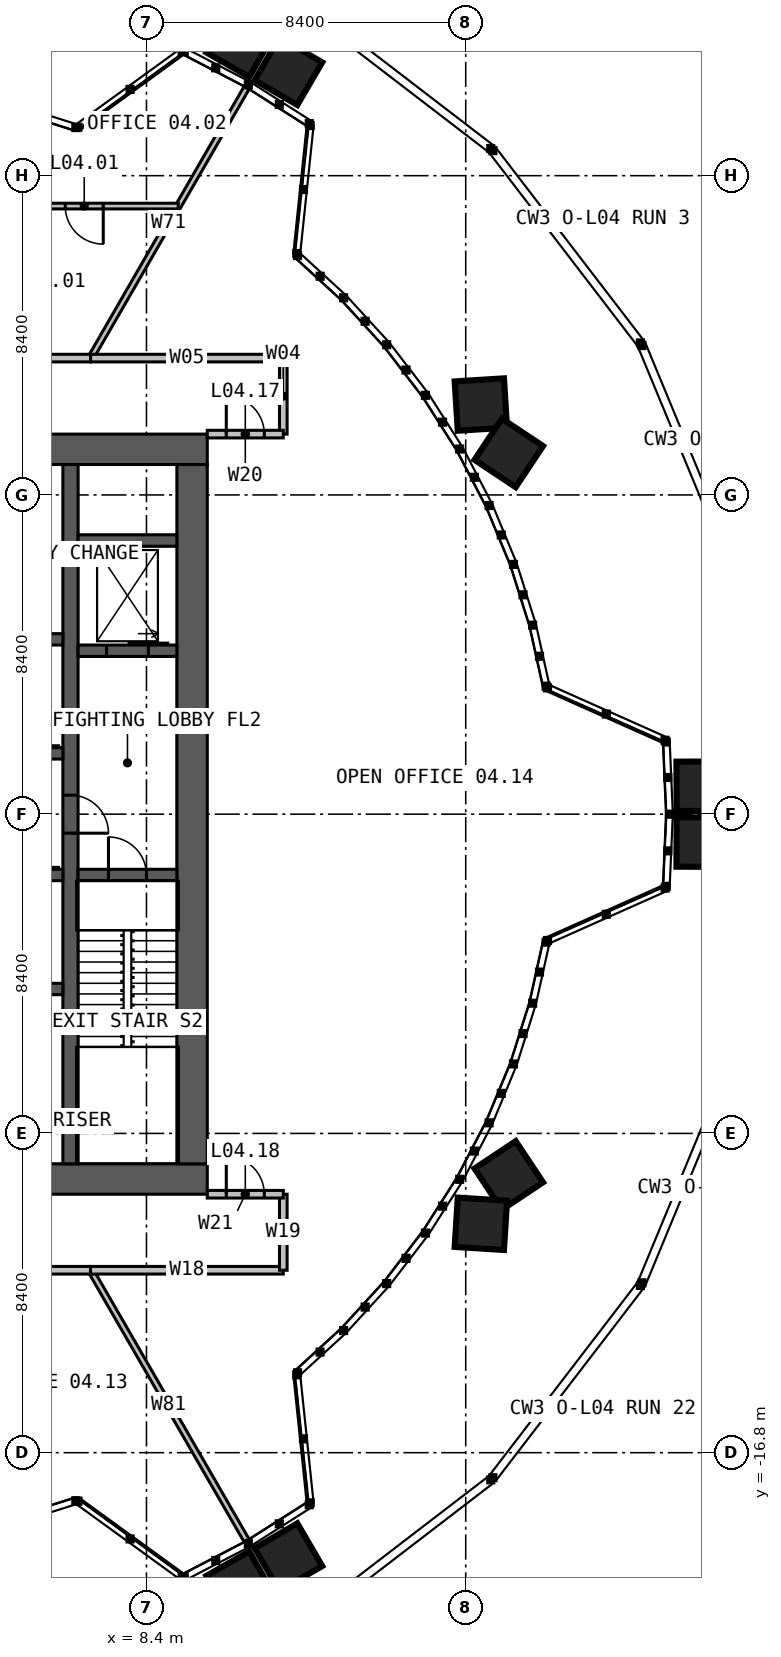
"""IFC4 building model, lengths in metres.
Left out: names, types, materials, properties, quantities, classifications, styles, units other than length and angle.
Written with IfcOpenShell. Run it as: python <this file> out.ifc"""

import sys

from ifc_helpers import new_model, si_unit, direction, frame, frame_2d, origin, place, context, subcontext, project, spatial, rectangle, extrude, element, fill, save


model = new_model("IFC4")
c1 = context("Model", 3, precision=1e-05, world=origin(), true_north=direction((0.0, 1.0)))
c2 = subcontext(c1, "Body", "Model", "MODEL_VIEW")
j1 = project(units=[si_unit("LENGTHUNIT", "METRE"), si_unit("PLANEANGLEUNIT", "RADIAN")], contexts=[c1])
p1 = place(None, origin())
s1 = spatial("IfcSite", under=j1, at=p1, CompositionType="ELEMENT")
p2 = place(p1, origin())
s2 = spatial("IfcBuilding", under=s1, at=p2, CompositionType="ELEMENT")
p3 = place(p2, frame((0.0, 0.0, 21.0)))
s3 = spatial("IfcBuildingStorey", under=s2, at=p3, CompositionType="ELEMENT", Elevation=21.0)
p4 = place(p3, frame((-10.0, 9.6, 0.0), z_axis=(0.0, 0.0, 1.0), x_axis=(1.0, 0.0, 0.0)))
e1 = element("IfcWall", 1, at=p4, inside=s3, PredefinedType="SOLIDWALL", context=c2, shape_type="SweptSolid", body=[
    extrude(rectangle(XDim=20.0, YDim=0.8, at=frame_2d((10.0, 0.0))), origin(), (0.0, 0.0, 1.0), 4.0),
])
p5 = place(p4, frame((9.4, 0.0, 0.0)))
e2 = element("IfcOpeningElement", 2, at=p5, cuts=e1, PredefinedType="OPENING", context=c2, shape_type="SweptSolid", body=[
    extrude(rectangle(XDim=1.2, YDim=2.2, at=frame_2d((0.6, 1.1))), frame((0.0, 0.41, 0.0), z_axis=(0.0, -1.0, 0.0), x_axis=(1.0, 0.0, 0.0)), (0.0, 0.0, 1.0), 0.82),
])
p6 = place(p3, frame((10.0, -9.6, 0.0), z_axis=(0.0, 0.0, 1.0), x_axis=(-1.0, 0.0, 0.0)))
e3 = element("IfcWall", 3, at=p6, inside=s3, PredefinedType="SOLIDWALL", context=c2, shape_type="SweptSolid", body=[
    extrude(rectangle(XDim=20.0, YDim=0.8, at=frame_2d((10.0, 0.0))), origin(), (0.0, 0.0, 1.0), 4.0),
])
p7 = place(p6, frame((6.875, 0.0, 0.0)))
e4 = element("IfcOpeningElement", 4, at=p7, cuts=e3, PredefinedType="OPENING", context=c2, shape_type="SweptSolid", body=[
    extrude(rectangle(XDim=1.2, YDim=2.2, at=frame_2d((0.6, 1.1))), frame((0.0, 0.41, 0.0), z_axis=(0.0, -1.0, 0.0), x_axis=(1.0, 0.0, 0.0)), (0.0, 0.0, 1.0), 0.82),
])
p8 = place(p3, frame((9.6, -9.2, 0.0), z_axis=(0.0, 0.0, 1.0), x_axis=(0.0, 1.0, 0.0)))
e5 = element("IfcWall", 5, at=p8, inside=s3, PredefinedType="SOLIDWALL", context=c2, shape_type="SweptSolid", body=[
    extrude(rectangle(XDim=18.4, YDim=0.8, at=frame_2d((9.2, 0.0))), origin(), (0.0, 0.0, 1.0), 4.0),
])
p9 = place(p3, frame((6.4, 9.2, 0.0), z_axis=(0.0, 0.0, 1.0), x_axis=(0.0, -1.0, 0.0)))
e6 = element("IfcWall", 6, at=p9, inside=s3, PredefinedType="SOLIDWALL", context=c2, shape_type="SweptSolid", body=[
    extrude(rectangle(XDim=18.4, YDim=0.4, at=frame_2d((9.2, 0.0))), origin(), (0.0, 0.0, 1.0), 4.0),
])
p10 = place(p9, frame((8.7, 0.0, 0.0)))
e7 = element("IfcOpeningElement", 7, at=p10, cuts=e6, PredefinedType="OPENING", context=c2, shape_type="SweptSolid", body=[
    extrude(rectangle(XDim=1.0, YDim=2.2, at=frame_2d((0.5, 1.1))), frame((0.0, 0.21, 0.0), z_axis=(0.0, -1.0, 0.0), x_axis=(1.0, 0.0, 0.0)), (0.0, 0.0, 1.0), 0.42),
])
p11 = place(p3, frame((1.35, 1.6, 0.0), z_axis=(0.0, 0.0, 1.0), x_axis=(1.0, 0.0, 0.0)))
e8 = element("IfcWall", 8, at=p11, inside=s3, PredefinedType="SOLIDWALL", context=c2, shape_type="SweptSolid", body=[
    extrude(rectangle(XDim=4.85, YDim=0.3, at=frame_2d((2.425, 0.0))), origin(), (0.0, 0.0, 1.0), 4.0),
])
p12 = place(p11, frame((0.6, 0.0, 0.0)))
e9 = element("IfcOpeningElement", 9, at=p12, cuts=e8, PredefinedType="OPENING", context=c2, shape_type="SweptSolid", body=[
    extrude(rectangle(XDim=1.1, YDim=2.2, at=frame_2d((0.55, 1.1))), frame((0.0, 0.16, 0.0), z_axis=(0.0, -1.0, 0.0), x_axis=(1.0, 0.0, 0.0)), (0.0, 0.0, 1.0), 0.32),
])
p13 = place(p11, frame((3.125, 0.0, 0.0)))
e10 = element("IfcOpeningElement", 10, at=p13, cuts=e8, PredefinedType="OPENING", context=c2, shape_type="SweptSolid", body=[
    extrude(rectangle(XDim=1.1, YDim=2.2, at=frame_2d((0.55, 1.1))), frame((0.0, 0.16, 0.0), z_axis=(0.0, -1.0, 0.0), x_axis=(1.0, 0.0, 0.0)), (0.0, 0.0, 1.0), 0.32),
])
p14 = place(p3, frame((1.35, 4.6, 0.0), z_axis=(0.0, 0.0, 1.0), x_axis=(1.0, 0.0, 0.0)))
e11 = element("IfcWall", 11, at=p14, inside=s3, PredefinedType="SOLIDWALL", context=c2, shape_type="SweptSolid", body=[
    extrude(rectangle(XDim=4.85, YDim=0.3, at=frame_2d((2.425, 0.0))), origin(), (0.0, 0.0, 1.0), 4.0),
])
p15 = place(p3, frame((3.85, -1.6, 0.0), z_axis=(0.0, 0.0, 1.0), x_axis=(1.0, 0.0, 0.0)))
e12 = element("IfcWall", 12, at=p15, inside=s3, PredefinedType="SOLIDWALL", context=c2, shape_type="SweptSolid", body=[
    extrude(rectangle(XDim=2.35, YDim=0.3, at=frame_2d((1.175, 0.0))), origin(), (0.0, 0.0, 1.0), 4.0),
])
p16 = place(p15, frame((0.625, 0.0, 0.0)))
e13 = element("IfcOpeningElement", 13, at=p16, cuts=e12, PredefinedType="OPENING", context=c2, shape_type="SweptSolid", body=[
    extrude(rectangle(XDim=1.1, YDim=2.2, at=frame_2d((0.55, 1.1))), frame((0.0, 0.16, 0.0), z_axis=(0.0, -1.0, 0.0), x_axis=(1.0, 0.0, 0.0)), (0.0, 0.0, 1.0), 0.32),
])
p17 = place(p3, frame((3.85, -4.6, 0.0), z_axis=(0.0, 0.0, 1.0), x_axis=(1.0, 0.0, 0.0)))
e14 = element("IfcWall", 14, at=p17, inside=s3, PredefinedType="SOLIDWALL", context=c2, shape_type="SweptSolid", body=[
    extrude(rectangle(XDim=2.35, YDim=0.3, at=frame_2d((1.175, 0.0))), origin(), (0.0, 0.0, 1.0), 4.0),
])
p18 = place(p3, frame((6.6, -1.6, 0.0), z_axis=(0.0, 0.0, 1.0), x_axis=(1.0, 0.0, 0.0)))
e15 = element("IfcWall", 15, at=p18, inside=s3, PredefinedType="SOLIDWALL", context=c2, shape_type="SweptSolid", body=[
    extrude(rectangle(XDim=2.6, YDim=0.3, at=frame_2d((1.3, 0.0))), origin(), (0.0, 0.0, 1.0), 4.0),
])
p19 = place(p18, frame((0.8, 0.0, 0.0)))
e16 = element("IfcOpeningElement", 16, at=p19, cuts=e15, PredefinedType="OPENING", context=c2, shape_type="SweptSolid", body=[
    extrude(rectangle(XDim=1.0, YDim=2.2, at=frame_2d((0.5, 1.1))), frame((0.0, 0.16, 0.0), z_axis=(0.0, -1.0, 0.0), x_axis=(1.0, 0.0, 0.0)), (0.0, 0.0, 1.0), 0.32),
])
p20 = place(p3, frame((6.6, 4.3, 0.0), z_axis=(0.0, 0.0, 1.0), x_axis=(1.0, 0.0, 0.0)))
e17 = element("IfcWall", 17, at=p20, inside=s3, PredefinedType="SOLIDWALL", context=c2, shape_type="SweptSolid", body=[
    extrude(rectangle(XDim=2.6, YDim=0.3, at=frame_2d((1.3, 0.0))), origin(), (0.0, 0.0, 1.0), 4.0),
])
p21 = place(p20, frame((0.75, 0.0, 0.0)))
e18 = element("IfcOpeningElement", 18, at=p21, cuts=e17, PredefinedType="OPENING", context=c2, shape_type="SweptSolid", body=[
    extrude(rectangle(XDim=1.1, YDim=2.2, at=frame_2d((0.55, 1.1))), frame((0.0, 0.16, 0.0), z_axis=(0.0, -1.0, 0.0), x_axis=(1.0, 0.0, 0.0)), (0.0, 0.0, 1.0), 0.32),
])
p22 = place(p3, frame((6.6, 7.2, 0.0), z_axis=(0.0, 0.0, 1.0), x_axis=(1.0, 0.0, 0.0)))
e19 = element("IfcWall", 19, at=p22, inside=s3, PredefinedType="SOLIDWALL", context=c2, shape_type="SweptSolid", body=[
    extrude(rectangle(XDim=2.6, YDim=0.3, at=frame_2d((1.3, 0.0))), origin(), (0.0, 0.0, 1.0), 4.0),
])
p23 = place(p3, frame((1.35, 6.8, 0.0), z_axis=(0.0, 0.0, 1.0), x_axis=(1.0, 0.0, 0.0)))
e20 = element("IfcWall", 20, at=p23, inside=s3, PredefinedType="PARTITIONING", context=c2, shape_type="SweptSolid", body=[
    extrude(rectangle(XDim=4.85, YDim=0.15, at=frame_2d((2.425, 0.0))), origin(), (0.0, 0.0, 1.0), 3.75),
])
for number, where, z_axis, x_axis in (
    (21, (6.928, 12.0, 0.0), (0.0, 0.0, 1.0), (0.5, 0.866, 0.0)),
    (22, (6.928, -12.0, 0.0), (0.0, 0.0, 1.0), (0.5, -0.866, 0.0)),
):
    element("IfcWall", number, at=place(p3, frame(where, z_axis=z_axis, x_axis=x_axis)), inside=s3, PredefinedType="PARTITIONING", context=c2, shape_type="SweptSolid", body=[
        extrude(rectangle(XDim=8.212, YDim=0.15, at=frame_2d((4.106, 0.0))), origin(), (0.0, 0.0, 1.0), 2.79),
    ])
p24 = place(p3, frame((12.0, 10.0, 0.0), z_axis=(0.0, 0.0, 1.0), x_axis=(0.0, 1.0, 0.0)))
e23 = element("IfcWall", 23, at=p24, inside=s3, PredefinedType="PARTITIONING", context=c2, shape_type="SweptSolid", body=[
    extrude(rectangle(XDim=2.0, YDim=0.2, at=frame_2d((1.0, 0.0))), origin(), (0.0, 0.0, 1.0), 3.8),
])
p25 = place(p3, frame((12.0, 12.0, 0.0), z_axis=(0.0, 0.0, 1.0), x_axis=(-1.0, 0.0, 0.0)))
e24 = element("IfcWall", 24, at=p25, inside=s3, PredefinedType="PARTITIONING", context=c2, shape_type="SweptSolid", body=[
    extrude(rectangle(XDim=5.072, YDim=0.2, at=frame_2d((2.536, 0.0))), origin(), (0.0, 0.0, 1.0), 3.8),
])
p26 = place(p3, frame((9.238, 16.0, 0.0), z_axis=(0.0, 0.0, 1.0), x_axis=(-1.0, 0.0, 0.0)))
e25 = element("IfcWall", 25, at=p26, inside=s3, PredefinedType="PARTITIONING", context=c2, shape_type="SweptSolid", body=[
    extrude(rectangle(XDim=9.238, YDim=0.15, at=frame_2d((4.619, 0.0))), origin(), (0.0, 0.0, 1.0), 2.79),
])
p27 = place(p26, frame((1.975, 0.0, 0.0)))
e26 = element("IfcOpeningElement", 26, at=p27, cuts=e25, PredefinedType="OPENING", context=c2, shape_type="SweptSolid", body=[
    extrude(rectangle(XDim=1.0, YDim=2.2, at=frame_2d((0.5, 1.1))), frame((0.0, 0.085, 0.0), z_axis=(0.0, -1.0, 0.0), x_axis=(1.0, 0.0, 0.0)), (0.0, 0.0, 1.0), 0.17),
])
p28 = place(p26, frame((5.541, 0.0, 0.0)))
e27 = element("IfcOpeningElement", 27, at=p28, cuts=e25, PredefinedType="OPENING", context=c2, shape_type="SweptSolid", body=[
    extrude(rectangle(XDim=1.0, YDim=2.2, at=frame_2d((0.5, 1.1))), frame((0.0, 0.085, 0.0), z_axis=(0.0, -1.0, 0.0), x_axis=(1.0, 0.0, 0.0)), (0.0, 0.0, 1.0), 0.17),
])
p29 = place(p26, frame((7.684, 0.0, 0.0)))
e28 = element("IfcOpeningElement", 28, at=p29, cuts=e25, PredefinedType="OPENING", context=c2, shape_type="SweptSolid", body=[
    extrude(rectangle(XDim=1.0, YDim=2.2, at=frame_2d((0.5, 1.1))), frame((0.0, 0.085, 0.0), z_axis=(0.0, -1.0, 0.0), x_axis=(1.0, 0.0, 0.0)), (0.0, 0.0, 1.0), 0.17),
])
p30 = place(p3, frame((6.928, 12.0, 0.0), z_axis=(0.0, 0.0, 1.0), x_axis=(-1.0, 0.0, 0.0)))
e29 = element("IfcWall", 29, at=p30, inside=s3, PredefinedType="PARTITIONING", context=c2, shape_type="SweptSolid", body=[
    extrude(rectangle(XDim=6.928, YDim=0.2, at=frame_2d((3.464, 0.0))), origin(), (0.0, 0.0, 1.0), 3.8),
])
p31 = place(p30, frame((2.964, 0.0, 0.0)))
e30 = element("IfcOpeningElement", 30, at=p31, cuts=e29, PredefinedType="OPENING", context=c2, shape_type="SweptSolid", body=[
    extrude(rectangle(XDim=1.0, YDim=2.2, at=frame_2d((0.5, 1.1))), frame((0.0, 0.11, 0.0), z_axis=(0.0, -1.0, 0.0), x_axis=(1.0, 0.0, 0.0)), (0.0, 0.0, 1.0), 0.22),
])
p32 = place(p3, frame((1.58, -12.0, 0.0), z_axis=(0.0, 0.0, 1.0), x_axis=(1.0, 0.0, 0.0)))
e31 = element("IfcWall", 31, at=p32, inside=s3, PredefinedType="PARTITIONING", context=c2, shape_type="SweptSolid", body=[
    extrude(rectangle(XDim=5.348, YDim=0.2, at=frame_2d((2.674, 0.0))), origin(), (0.0, 0.0, 1.0), 3.8),
])
p33 = place(p32, frame((1.774, 0.0, 0.0)))
e32 = element("IfcOpeningElement", 32, at=p33, cuts=e31, PredefinedType="OPENING", context=c2, shape_type="SweptSolid", body=[
    extrude(rectangle(XDim=1.8, YDim=2.2, at=frame_2d((0.9, 1.1))), frame((0.0, 0.11, 0.0), z_axis=(0.0, -1.0, 0.0), x_axis=(1.0, 0.0, 0.0)), (0.0, 0.0, 1.0), 0.22),
])
p34 = place(p3, frame((6.928, -12.0, 0.0), z_axis=(0.0, 0.0, 1.0), x_axis=(1.0, 0.0, 0.0)))
e33 = element("IfcWall", 33, at=p34, inside=s3, PredefinedType="PARTITIONING", context=c2, shape_type="SweptSolid", body=[
    extrude(rectangle(XDim=5.072, YDim=0.2, at=frame_2d((2.536, 0.0))), origin(), (0.0, 0.0, 1.0), 3.8),
])
p35 = place(p3, frame((12.0, -12.0, 0.0), z_axis=(0.0, 0.0, 1.0), x_axis=(0.0, 1.0, 0.0)))
e34 = element("IfcWall", 34, at=p35, inside=s3, PredefinedType="PARTITIONING", context=c2, shape_type="SweptSolid", body=[
    extrude(rectangle(XDim=2.0, YDim=0.2, at=frame_2d((1.0, 0.0))), origin(), (0.0, 0.0, 1.0), 3.8),
])
p36 = place(p3, frame((10.0, 10.0, 0.0), z_axis=(0.0, 0.0, 1.0), x_axis=(1.0, 0.0, 0.0)))
e35 = element("IfcWall", 35, at=p36, inside=s3, PredefinedType="PARTITIONING", context=c2, shape_type="SweptSolid", body=[
    extrude(rectangle(XDim=2.0, YDim=0.2, at=frame_2d((1.0, 0.0))), origin(), (0.0, 0.0, 1.0), 3.8),
])
p37 = place(p36, frame((0.5, 0.0, 0.0)))
e36 = element("IfcOpeningElement", 36, at=p37, cuts=e35, PredefinedType="OPENING", context=c2, shape_type="SweptSolid", body=[
    extrude(rectangle(XDim=1.0, YDim=2.2, at=frame_2d((0.5, 1.1))), frame((0.0, 0.11, 0.0), z_axis=(0.0, -1.0, 0.0), x_axis=(1.0, 0.0, 0.0)), (0.0, 0.0, 1.0), 0.22),
])
p38 = place(p3, frame((10.0, -10.0, 0.0), z_axis=(0.0, 0.0, 1.0), x_axis=(1.0, 0.0, 0.0)))
e37 = element("IfcWall", 37, at=p38, inside=s3, PredefinedType="PARTITIONING", context=c2, shape_type="SweptSolid", body=[
    extrude(rectangle(XDim=2.0, YDim=0.2, at=frame_2d((1.0, 0.0))), origin(), (0.0, 0.0, 1.0), 3.8),
])
p39 = place(p38, frame((0.5, 0.0, 0.0)))
e38 = element("IfcOpeningElement", 38, at=p39, cuts=e37, PredefinedType="OPENING", context=c2, shape_type="SweptSolid", body=[
    extrude(rectangle(XDim=1.0, YDim=2.2, at=frame_2d((0.5, 1.1))), frame((0.0, 0.11, 0.0), z_axis=(0.0, -1.0, 0.0), x_axis=(1.0, 0.0, 0.0)), (0.0, 0.0, 1.0), 0.22),
])
p40 = place(p10, origin())
e39 = element("IfcDoor", 39, at=p40, inside=s3, OperationType="SINGLE_SWING_RIGHT", PredefinedType="DOOR", context=c2, shape_type="SweptSolid", body=[
    extrude(rectangle(XDim=1.0, YDim=2.2, at=frame_2d((0.5, 1.1))), frame((0.0, 0.025, 0.0), z_axis=(0.0, -1.0, 0.0), x_axis=(1.0, 0.0, 0.0)), (0.0, 0.0, 1.0), 0.05),
])
fill(e7, e39)
p41 = place(p19, origin())
e40 = element("IfcDoor", 40, at=p41, inside=s3, OperationType="SINGLE_SWING_LEFT", PredefinedType="DOOR", context=c2, shape_type="SweptSolid", body=[
    extrude(rectangle(XDim=1.0, YDim=2.2, at=frame_2d((0.5, 1.1))), frame((0.0, 0.025, 0.0), z_axis=(0.0, -1.0, 0.0), x_axis=(1.0, 0.0, 0.0)), (0.0, 0.0, 1.0), 0.05),
])
fill(e16, e40)
p42 = place(p21, origin())
e41 = element("IfcDoor", 41, at=p42, inside=s3, OperationType="SLIDING_TO_LEFT", PredefinedType="DOOR", context=c2, shape_type="SweptSolid", body=[
    extrude(rectangle(XDim=1.1, YDim=2.2, at=frame_2d((0.55, 1.1))), frame((0.0, 0.025, 0.0), z_axis=(0.0, -1.0, 0.0), x_axis=(1.0, 0.0, 0.0)), (0.0, 0.0, 1.0), 0.05),
])
fill(e18, e41)
p43 = place(p27, origin())
e42 = element("IfcDoor", 42, at=p43, inside=s3, OperationType="SINGLE_SWING_LEFT", PredefinedType="DOOR", context=c2, shape_type="SweptSolid", body=[
    extrude(rectangle(XDim=1.0, YDim=2.2, at=frame_2d((0.5, 1.1))), frame((0.0, 0.025, 0.0), z_axis=(0.0, -1.0, 0.0), x_axis=(1.0, 0.0, 0.0)), (0.0, 0.0, 1.0), 0.05),
])
fill(e26, e42)
p44 = place(p37, origin())
e43 = element("IfcDoor", 43, at=p44, inside=s3, OperationType="SINGLE_SWING_LEFT", PredefinedType="DOOR", context=c2, shape_type="SweptSolid", body=[
    extrude(rectangle(XDim=1.0, YDim=2.2, at=frame_2d((0.5, 1.1))), frame((0.0, 0.025, 0.0), z_axis=(0.0, -1.0, 0.0), x_axis=(1.0, 0.0, 0.0)), (0.0, 0.0, 1.0), 0.05),
])
fill(e36, e43)
p45 = place(p39, origin())
e44 = element("IfcDoor", 44, at=p45, inside=s3, OperationType="SINGLE_SWING_LEFT", PredefinedType="DOOR", context=c2, shape_type="SweptSolid", body=[
    extrude(rectangle(XDim=1.0, YDim=2.2, at=frame_2d((0.5, 1.1))), frame((0.0, 0.025, 0.0), z_axis=(0.0, -1.0, 0.0), x_axis=(1.0, 0.0, 0.0)), (0.0, 0.0, 1.0), 0.05),
])
fill(e38, e44)
save(model, sys.argv[1])
